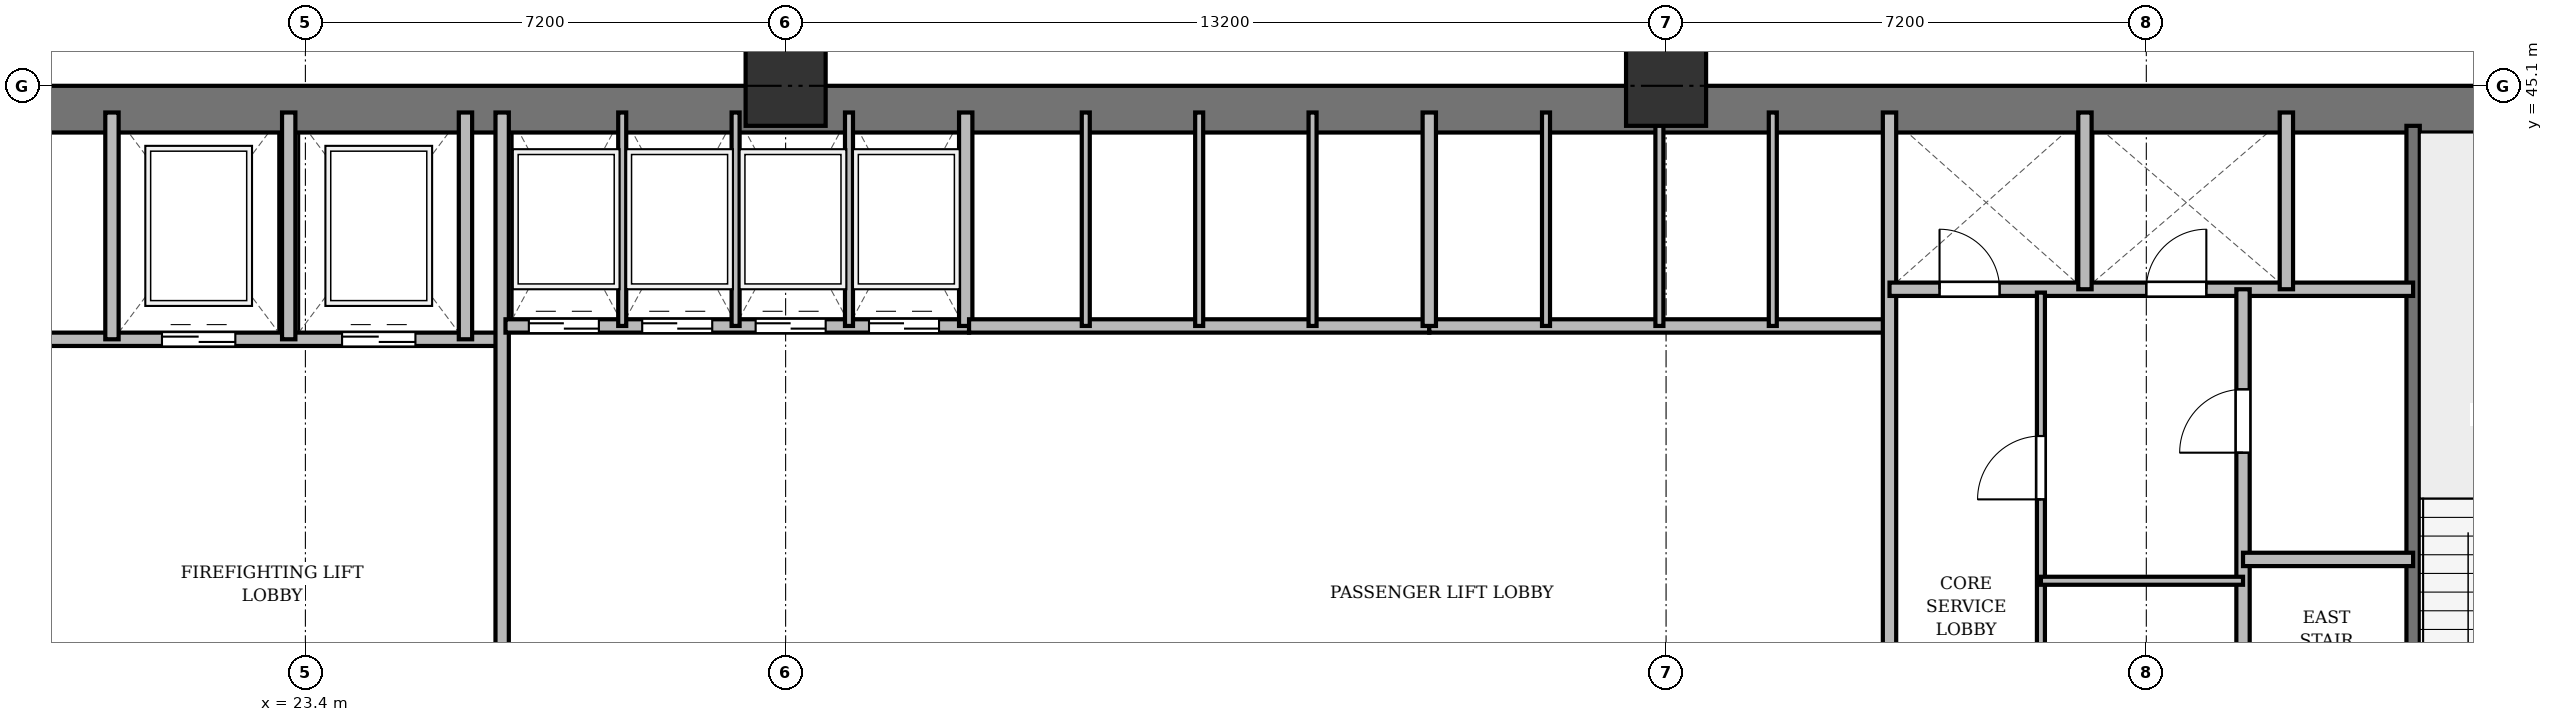
"""IFC4 building model, lengths in metres.
Left out: names, types, materials, properties, quantities, classifications, styles, units other than length and angle.
Written with IfcOpenShell. Run it as: python <this file> out.ifc"""

import sys

from ifc_helpers import new_model, si_unit, direction, frame, frame_2d, origin, origin_2d, place, context, subcontext, project, spatial, rectangle, extrude, source, transform, mapped, element, fill, save


model = new_model("IFC4")
c1 = context("Model", 3, precision=1e-05, world=origin(), true_north=direction((0.0, 1.0)))
c2 = subcontext(c1, "Body", "Model", "MODEL_VIEW")
j1 = project(units=[si_unit("LENGTHUNIT", "METRE"), si_unit("PLANEANGLEUNIT", "RADIAN")], contexts=[c1])
p1 = place(None, origin())
s1 = spatial("IfcSite", under=j1, at=p1, CompositionType="ELEMENT")
p2 = place(p1, origin())
s2 = spatial("IfcBuilding", under=s1, at=p2, CompositionType="ELEMENT")
p3 = place(p2, frame((0.0, 0.0, 5.2)))
s3 = spatial("IfcBuildingStorey", under=s2, at=p3, CompositionType="ELEMENT", Elevation=5.2)
m1 = source(origin(), c2, "Body", "SweptSolid", [
    extrude(rectangle(XDim=1.2, YDim=1.2, at=origin_2d()), origin(), (0.0, 0.0, 1.0), 4.5),
])
for number, where, z_axis, x_axis in (
    (1, (30.6, 45.1, 0.0), (0.0, 0.0, 1.0), (1.0, 0.0, 0.0)),
    (2, (43.8, 45.1, 0.0), (0.0, 0.0, 1.0), (1.0, 0.0, 0.0)),
):
    element("IfcColumn", number, at=place(p3, frame(where, z_axis=z_axis, x_axis=x_axis)), inside=s3, PredefinedType="COLUMN", context=c2, shape_type="MappedRepresentation", body=[
        mapped(m1, transform((0.0, 0.0, 0.0), x_axis=(1.0, 0.0, 0.0), y_axis=(0.0, 1.0, 0.0), z_axis=(0.0, 0.0, 1.0), scale=1.0)),
    ])
p4 = place(p3, frame((15.5, 44.75, 0.0), z_axis=(0.0, 0.0, 1.0), x_axis=(1.0, 0.0, 0.0)))
e3 = element("IfcWall", 3, at=p4, inside=s3, PredefinedType="SHEAR", context=c2, shape_type="SweptSolid", body=[
    extrude(rectangle(XDim=43.4, YDim=0.7, at=frame_2d((21.7, 0.0))), origin(), (0.0, 0.0, 1.0), 4.2),
])
p5 = place(p3, frame((55.0, 33.4, 0.0), z_axis=(0.0, 0.0, 1.0), x_axis=(0.0, 1.0, 0.0)))
e4 = element("IfcWall", 4, at=p5, inside=s3, PredefinedType="SHEAR", context=c2, shape_type="SweptSolid", body=[
    extrude(rectangle(XDim=11.1, YDim=0.2, at=frame_2d((5.55, 0.0))), origin(), (0.0, 0.0, 1.0), 4.2),
])
p6 = place(p5, frame((0.85, 0.0, 0.0)))
e5 = element("IfcOpeningElement", 5, at=p6, cuts=e4, PredefinedType="OPENING", context=c2, shape_type="SweptSolid", body=[
    extrude(rectangle(XDim=1.1, YDim=2.15, at=frame_2d((0.55, 1.075))), frame((0.0, 0.11, 0.0), z_axis=(0.0, -1.0, 0.0), x_axis=(1.0, 0.0, 0.0)), (0.0, 0.0, 1.0), 0.22),
])
p7 = place(p3, frame((19.55, 41.3, 0.0), z_axis=(0.0, 0.0, 1.0), x_axis=(1.0, 0.0, 0.0)))
e6 = element("IfcWall", 6, at=p7, inside=s3, PredefinedType="SOLIDWALL", context=c2, shape_type="SweptSolid", body=[
    extrude(rectangle(XDim=6.75, YDim=0.2, at=frame_2d((3.375, 0.0))), origin(), (0.0, 0.0, 1.0), 4.2),
])
p8 = place(p7, frame((1.7, 0.0, 0.0)))
e7 = element("IfcOpeningElement", 7, at=p8, cuts=e6, PredefinedType="OPENING", context=c2, shape_type="SweptSolid", body=[
    extrude(rectangle(XDim=1.1, YDim=2.15, at=frame_2d((0.55, 1.075))), frame((0.0, 0.11, 0.0), z_axis=(0.0, -1.0, 0.0), x_axis=(1.0, 0.0, 0.0)), (0.0, 0.0, 1.0), 0.22),
])
p9 = place(p7, frame((4.4, 0.0, 0.0)))
e8 = element("IfcOpeningElement", 8, at=p9, cuts=e6, PredefinedType="OPENING", context=c2, shape_type="SweptSolid", body=[
    extrude(rectangle(XDim=1.1, YDim=2.15, at=frame_2d((0.55, 1.075))), frame((0.0, 0.11, 0.0), z_axis=(0.0, -1.0, 0.0), x_axis=(1.0, 0.0, 0.0)), (0.0, 0.0, 1.0), 0.22),
])
for number, where, z_axis, x_axis in (
    (9, (20.5, 41.3, 0.0), (0.0, 0.0, 1.0), (0.0, 1.0, 0.0)),
    (10, (23.15, 41.3, 0.0), (0.0, 0.0, 1.0), (0.0, 1.0, 0.0)),
    (11, (25.8, 41.3, 0.0), (0.0, 0.0, 1.0), (0.0, 1.0, 0.0)),
):
    element("IfcWall", number, at=place(p3, frame(where, z_axis=z_axis, x_axis=x_axis)), inside=s3, PredefinedType="SOLIDWALL", context=c2, shape_type="SweptSolid", body=[
        extrude(rectangle(XDim=3.4, YDim=0.2, at=frame_2d((1.7, 0.0))), origin(), (0.0, 0.0, 1.0), 4.2),
    ])
p10 = place(p3, frame((26.35, 33.4, 0.0), z_axis=(0.0, 0.0, 1.0), x_axis=(0.0, 1.0, 0.0)))
e12 = element("IfcWall", 12, at=p10, inside=s3, PredefinedType="SOLIDWALL", context=c2, shape_type="SweptSolid", body=[
    extrude(rectangle(XDim=11.3, YDim=0.2, at=frame_2d((5.65, 0.0))), origin(), (0.0, 0.0, 1.0), 3.1),
])
p11 = place(p3, frame((26.4, 41.5, 0.0), z_axis=(0.0, 0.0, 1.0), x_axis=(1.0, 0.0, 0.0)))
e13 = element("IfcWall", 13, at=p11, inside=s3, PredefinedType="SOLIDWALL", context=c2, shape_type="SweptSolid", body=[
    extrude(rectangle(XDim=6.95, YDim=0.2, at=frame_2d((3.475, 0.0))), origin(), (0.0, 0.0, 1.0), 4.2),
])
p12 = place(p11, frame((0.35, 0.0, 0.0)))
e14 = element("IfcOpeningElement", 14, at=p12, cuts=e13, PredefinedType="OPENING", context=c2, shape_type="SweptSolid", body=[
    extrude(rectangle(XDim=1.05, YDim=2.15, at=frame_2d((0.525, 1.075))), frame((0.0, 0.11, 0.0), z_axis=(0.0, -1.0, 0.0), x_axis=(1.0, 0.0, 0.0)), (0.0, 0.0, 1.0), 0.22),
])
p13 = place(p11, frame((2.05, 0.0, 0.0)))
e15 = element("IfcOpeningElement", 15, at=p13, cuts=e13, PredefinedType="OPENING", context=c2, shape_type="SweptSolid", body=[
    extrude(rectangle(XDim=1.05, YDim=2.15, at=frame_2d((0.525, 1.075))), frame((0.0, 0.11, 0.0), z_axis=(0.0, -1.0, 0.0), x_axis=(1.0, 0.0, 0.0)), (0.0, 0.0, 1.0), 0.22),
])
p14 = place(p11, frame((3.75, 0.0, 0.0)))
e16 = element("IfcOpeningElement", 16, at=p14, cuts=e13, PredefinedType="OPENING", context=c2, shape_type="SweptSolid", body=[
    extrude(rectangle(XDim=1.05, YDim=2.15, at=frame_2d((0.525, 1.075))), frame((0.0, 0.11, 0.0), z_axis=(0.0, -1.0, 0.0), x_axis=(1.0, 0.0, 0.0)), (0.0, 0.0, 1.0), 0.22),
])
p15 = place(p11, frame((5.45, 0.0, 0.0)))
e17 = element("IfcOpeningElement", 17, at=p15, cuts=e13, PredefinedType="OPENING", context=c2, shape_type="SweptSolid", body=[
    extrude(rectangle(XDim=1.05, YDim=2.15, at=frame_2d((0.525, 1.075))), frame((0.0, 0.11, 0.0), z_axis=(0.0, -1.0, 0.0), x_axis=(1.0, 0.0, 0.0)), (0.0, 0.0, 1.0), 0.22),
])
p16 = place(p3, frame((33.3, 41.5, 0.0), z_axis=(0.0, 0.0, 1.0), x_axis=(0.0, 1.0, 0.0)))
e18 = element("IfcWall", 18, at=p16, inside=s3, PredefinedType="SOLIDWALL", context=c2, shape_type="SweptSolid", body=[
    extrude(rectangle(XDim=3.2, YDim=0.2, at=frame_2d((1.6, 0.0))), origin(), (0.0, 0.0, 1.0), 4.2),
])
for number, where, z_axis, x_axis in (
    (19, (28.15, 41.5, 0.0), (0.0, 0.0, 1.0), (0.0, 1.0, 0.0)),
    (20, (29.85, 41.5, 0.0), (0.0, 0.0, 1.0), (0.0, 1.0, 0.0)),
    (21, (31.55, 41.5, 0.0), (0.0, 0.0, 1.0), (0.0, 1.0, 0.0)),
):
    element("IfcWall", number, at=place(p3, frame(where, z_axis=z_axis, x_axis=x_axis)), inside=s3, PredefinedType="PARTITIONING", context=c2, shape_type="SweptSolid", body=[
        extrude(rectangle(XDim=3.2, YDim=0.12, at=frame_2d((1.6, 0.0))), origin(), (0.0, 0.0, 1.0), 4.2),
    ])
p17 = place(p3, frame((33.35, 41.5, 0.0), z_axis=(0.0, 0.0, 1.0), x_axis=(1.0, 0.0, 0.0)))
e22 = element("IfcWall", 22, at=p17, inside=s3, PredefinedType="SOLIDWALL", context=c2, shape_type="SweptSolid", body=[
    extrude(rectangle(XDim=6.9, YDim=0.2, at=frame_2d((3.45, 0.0))), origin(), (0.0, 0.0, 1.0), 4.2),
])
for number, where, z_axis, x_axis in (
    (23, (35.1, 41.5, 0.0), (0.0, 0.0, 1.0), (0.0, 1.0, 0.0)),
    (24, (36.8, 41.5, 0.0), (0.0, 0.0, 1.0), (0.0, 1.0, 0.0)),
    (25, (38.5, 41.5, 0.0), (0.0, 0.0, 1.0), (0.0, 1.0, 0.0)),
):
    element("IfcWall", number, at=place(p3, frame(where, z_axis=z_axis, x_axis=x_axis)), inside=s3, PredefinedType="PARTITIONING", context=c2, shape_type="SweptSolid", body=[
        extrude(rectangle(XDim=3.2, YDim=0.12, at=frame_2d((1.6, 0.0))), origin(), (0.0, 0.0, 1.0), 4.2),
    ])
p18 = place(p3, frame((40.25, 41.5, 0.0), z_axis=(0.0, 0.0, 1.0), x_axis=(1.0, 0.0, 0.0)))
e26 = element("IfcWall", 26, at=p18, inside=s3, PredefinedType="SOLIDWALL", context=c2, shape_type="SweptSolid", body=[
    extrude(rectangle(XDim=6.9, YDim=0.2, at=frame_2d((3.45, 0.0))), origin(), (0.0, 0.0, 1.0), 3.4),
])
p19 = place(p3, frame((40.25, 41.5, 0.0), z_axis=(0.0, 0.0, 1.0), x_axis=(0.0, 1.0, 0.0)))
e27 = element("IfcWall", 27, at=p19, inside=s3, PredefinedType="SOLIDWALL", context=c2, shape_type="SweptSolid", body=[
    extrude(rectangle(XDim=3.2, YDim=0.2, at=frame_2d((1.6, 0.0))), origin(), (0.0, 0.0, 1.0), 4.2),
])
p20 = place(p3, frame((42.0, 41.5, 0.0), z_axis=(0.0, 0.0, 1.0), x_axis=(0.0, 1.0, 0.0)))
e28 = element("IfcWall", 28, at=p20, inside=s3, PredefinedType="PARTITIONING", context=c2, shape_type="SweptSolid", body=[
    extrude(rectangle(XDim=3.2, YDim=0.12, at=frame_2d((1.6, 0.0))), origin(), (0.0, 0.0, 1.0), 4.2),
])
p21 = place(p3, frame((43.7, 41.5, 0.0), z_axis=(0.0, 0.0, 1.0), x_axis=(0.0, 1.0, 0.0)))
e29 = element("IfcWall", 29, at=p21, inside=s3, PredefinedType="PARTITIONING", context=c2, shape_type="SweptSolid", body=[
    extrude(rectangle(XDim=3.2, YDim=0.12, at=frame_2d((1.6, 0.0))), origin(), (0.0, 0.0, 1.0), 3.4),
])
p22 = place(p3, frame((45.4, 41.5, 0.0), z_axis=(0.0, 0.0, 1.0), x_axis=(0.0, 1.0, 0.0)))
e30 = element("IfcWall", 30, at=p22, inside=s3, PredefinedType="PARTITIONING", context=c2, shape_type="SweptSolid", body=[
    extrude(rectangle(XDim=3.2, YDim=0.12, at=frame_2d((1.6, 0.0))), origin(), (0.0, 0.0, 1.0), 4.2),
])
p23 = place(p3, frame((47.15, 33.4, 0.0), z_axis=(0.0, 0.0, 1.0), x_axis=(0.0, 1.0, 0.0)))
e31 = element("IfcWall", 31, at=p23, inside=s3, PredefinedType="SOLIDWALL", context=c2, shape_type="SweptSolid", body=[
    extrude(rectangle(XDim=11.3, YDim=0.2, at=frame_2d((5.65, 0.0))), origin(), (0.0, 0.0, 1.0), 3.1),
])
p24 = place(p3, frame((47.15, 42.05, 0.0), z_axis=(0.0, 0.0, 1.0), x_axis=(1.0, 0.0, 0.0)))
e32 = element("IfcWall", 32, at=p24, inside=s3, PredefinedType="SOLIDWALL", context=c2, shape_type="SweptSolid", body=[
    extrude(rectangle(XDim=7.85, YDim=0.2, at=frame_2d((3.925, 0.0))), origin(), (0.0, 0.0, 1.0), 4.2),
])
p25 = place(p24, frame((0.75, 0.0, 0.0)))
e33 = element("IfcOpeningElement", 33, at=p25, cuts=e32, PredefinedType="OPENING", context=c2, shape_type="SweptSolid", body=[
    extrude(rectangle(XDim=0.9, YDim=2.1, at=frame_2d((0.45, 1.05))), frame((0.0, 0.11, 0.0), z_axis=(0.0, -1.0, 0.0), x_axis=(1.0, 0.0, 0.0)), (0.0, 0.0, 1.0), 0.22),
])
p26 = place(p24, frame((3.85, 0.0, 0.0)))
e34 = element("IfcOpeningElement", 34, at=p26, cuts=e32, PredefinedType="OPENING", context=c2, shape_type="SweptSolid", body=[
    extrude(rectangle(XDim=0.9, YDim=2.1, at=frame_2d((0.45, 1.05))), frame((0.0, 0.11, 0.0), z_axis=(0.0, -1.0, 0.0), x_axis=(1.0, 0.0, 0.0)), (0.0, 0.0, 1.0), 0.22),
])
for number, where, z_axis, x_axis in (
    (35, (50.08, 42.05, 0.0), (0.0, 0.0, 1.0), (0.0, 1.0, 0.0)),
    (36, (53.1, 42.05, 0.0), (0.0, 0.0, 1.0), (0.0, 1.0, 0.0)),
):
    element("IfcWall", number, at=place(p3, frame(where, z_axis=z_axis, x_axis=x_axis)), inside=s3, PredefinedType="SOLIDWALL", context=c2, shape_type="SweptSolid", body=[
        extrude(rectangle(XDim=2.65, YDim=0.2, at=frame_2d((1.325, 0.0))), origin(), (0.0, 0.0, 1.0), 4.2),
    ])
p27 = place(p3, frame((52.45, 33.4, 0.0), z_axis=(0.0, 0.0, 1.0), x_axis=(0.0, 1.0, 0.0)))
e37 = element("IfcWall", 37, at=p27, inside=s3, PredefinedType="PARTITIONING", context=c2, shape_type="SweptSolid", body=[
    extrude(rectangle(XDim=8.65, YDim=0.2, at=frame_2d((4.325, 0.0))), origin(), (0.0, 0.0, 1.0), 3.1),
])
p28 = place(p27, frame((6.2, 0.0, 0.0)))
e38 = element("IfcOpeningElement", 38, at=p28, cuts=e37, PredefinedType="OPENING", context=c2, shape_type="SweptSolid", body=[
    extrude(rectangle(XDim=0.95, YDim=2.15, at=frame_2d((0.475, 1.075))), frame((0.0, 0.11, 0.0), z_axis=(0.0, -1.0, 0.0), x_axis=(1.0, 0.0, 0.0)), (0.0, 0.0, 1.0), 0.22),
])
p29 = place(p3, frame((52.45, 38.0, 0.0), z_axis=(0.0, 0.0, 1.0), x_axis=(1.0, 0.0, 0.0)))
e39 = element("IfcWall", 39, at=p29, inside=s3, PredefinedType="PARTITIONING", context=c2, shape_type="SweptSolid", body=[
    extrude(rectangle(XDim=2.55, YDim=0.2, at=frame_2d((1.275, 0.0))), origin(), (0.0, 0.0, 1.0), 4.2),
])
p30 = place(p3, frame((49.42, 33.4, 0.0), z_axis=(0.0, 0.0, 1.0), x_axis=(0.0, 1.0, 0.0)))
e40 = element("IfcWall", 40, at=p30, inside=s3, PredefinedType="PARTITIONING", context=c2, shape_type="SweptSolid", body=[
    extrude(rectangle(XDim=8.6, YDim=0.12, at=frame_2d((4.3, 0.0))), origin(), (0.0, 0.0, 1.0), 3.1),
])
p31 = place(p30, frame((1.3, 0.0, 0.0)))
e41 = element("IfcOpeningElement", 41, at=p31, cuts=e40, PredefinedType="OPENING", context=c2, shape_type="SweptSolid", body=[
    extrude(rectangle(XDim=0.95, YDim=2.15, at=frame_2d((0.475, 1.075))), frame((0.0, 0.07, 0.0), z_axis=(0.0, -1.0, 0.0), x_axis=(1.0, 0.0, 0.0)), (0.0, 0.0, 1.0), 0.14),
])
p32 = place(p30, frame((5.5, 0.0, 0.0)))
e42 = element("IfcOpeningElement", 42, at=p32, cuts=e40, PredefinedType="OPENING", context=c2, shape_type="SweptSolid", body=[
    extrude(rectangle(XDim=0.95, YDim=2.15, at=frame_2d((0.475, 1.075))), frame((0.0, 0.07, 0.0), z_axis=(0.0, -1.0, 0.0), x_axis=(1.0, 0.0, 0.0)), (0.0, 0.0, 1.0), 0.14),
])
p33 = place(p3, frame((49.42, 37.68, 0.0), z_axis=(0.0, 0.0, 1.0), x_axis=(1.0, 0.0, 0.0)))
e43 = element("IfcWall", 43, at=p33, inside=s3, PredefinedType="PARTITIONING", context=c2, shape_type="SweptSolid", body=[
    extrude(rectangle(XDim=3.03, YDim=0.12, at=frame_2d((1.515, 0.0))), origin(), (0.0, 0.0, 1.0), 4.2),
])
m2 = source(origin(), c2, "Body", "SweptSolid", [
    extrude(rectangle(XDim=1.1, YDim=2.15, at=frame_2d((0.55, 1.075))), frame((0.0, 0.025, 0.0), z_axis=(0.0, -1.0, 0.0), x_axis=(1.0, 0.0, 0.0)), (0.0, 0.0, 1.0), 0.05),
])
p34 = place(p8, origin())
e44 = element("IfcDoor", 44, at=p34, inside=s3, OperationType="DOUBLE_DOOR_SLIDING", PredefinedType="DOOR", context=c2, shape_type="MappedRepresentation", body=[
    mapped(m2, transform((0.0, 0.0, 0.0), x_axis=(1.0, 0.0, 0.0), y_axis=(0.0, 1.0, 0.0), z_axis=(0.0, 0.0, 1.0), scale=1.0)),
])
fill(e7, e44)
p35 = place(p9, origin())
e45 = element("IfcDoor", 45, at=p35, inside=s3, OperationType="DOUBLE_DOOR_SLIDING", PredefinedType="DOOR", context=c2, shape_type="MappedRepresentation", body=[
    mapped(m2, transform((0.0, 0.0, 0.0), x_axis=(1.0, 0.0, 0.0), y_axis=(0.0, 1.0, 0.0), z_axis=(0.0, 0.0, 1.0), scale=1.0)),
])
fill(e8, e45)
m3 = source(origin(), c2, "Body", "SweptSolid", [
    extrude(rectangle(XDim=1.05, YDim=2.15, at=frame_2d((0.525, 1.075))), frame((0.0, 0.025, 0.0), z_axis=(0.0, -1.0, 0.0), x_axis=(1.0, 0.0, 0.0)), (0.0, 0.0, 1.0), 0.05),
])
p36 = place(p12, origin())
e46 = element("IfcDoor", 46, at=p36, inside=s3, OperationType="DOUBLE_DOOR_SLIDING", PredefinedType="DOOR", context=c2, shape_type="MappedRepresentation", body=[
    mapped(m3, transform((0.0, 0.0, 0.0), x_axis=(1.0, 0.0, 0.0), y_axis=(0.0, 1.0, 0.0), z_axis=(0.0, 0.0, 1.0), scale=1.0)),
])
fill(e14, e46)
p37 = place(p13, origin())
e47 = element("IfcDoor", 47, at=p37, inside=s3, OperationType="DOUBLE_DOOR_SLIDING", PredefinedType="DOOR", context=c2, shape_type="MappedRepresentation", body=[
    mapped(m3, transform((0.0, 0.0, 0.0), x_axis=(1.0, 0.0, 0.0), y_axis=(0.0, 1.0, 0.0), z_axis=(0.0, 0.0, 1.0), scale=1.0)),
])
fill(e15, e47)
p38 = place(p14, origin())
e48 = element("IfcDoor", 48, at=p38, inside=s3, OperationType="DOUBLE_DOOR_SLIDING", PredefinedType="DOOR", context=c2, shape_type="MappedRepresentation", body=[
    mapped(m3, transform((0.0, 0.0, 0.0), x_axis=(1.0, 0.0, 0.0), y_axis=(0.0, 1.0, 0.0), z_axis=(0.0, 0.0, 1.0), scale=1.0)),
])
fill(e16, e48)
p39 = place(p15, origin())
e49 = element("IfcDoor", 49, at=p39, inside=s3, OperationType="DOUBLE_DOOR_SLIDING", PredefinedType="DOOR", context=c2, shape_type="MappedRepresentation", body=[
    mapped(m3, transform((0.0, 0.0, 0.0), x_axis=(1.0, 0.0, 0.0), y_axis=(0.0, 1.0, 0.0), z_axis=(0.0, 0.0, 1.0), scale=1.0)),
])
fill(e17, e49)
m4 = source(origin(), c2, "Body", "SweptSolid", [
    extrude(rectangle(XDim=0.9, YDim=2.1, at=frame_2d((0.45, 1.05))), frame((0.0, 0.025, 0.0), z_axis=(0.0, -1.0, 0.0), x_axis=(1.0, 0.0, 0.0)), (0.0, 0.0, 1.0), 0.05),
])
p40 = place(p25, origin())
e50 = element("IfcDoor", 50, at=p40, inside=s3, OperationType="SINGLE_SWING_LEFT", PredefinedType="DOOR", context=c2, shape_type="MappedRepresentation", body=[
    mapped(m4, transform((0.0, 0.0, 0.0), x_axis=(1.0, 0.0, 0.0), y_axis=(0.0, 1.0, 0.0), z_axis=(0.0, 0.0, 1.0), scale=1.0)),
])
fill(e33, e50)
p41 = place(p26, origin())
e51 = element("IfcDoor", 51, at=p41, inside=s3, OperationType="SINGLE_SWING_RIGHT", PredefinedType="DOOR", context=c2, shape_type="MappedRepresentation", body=[
    mapped(m4, transform((0.0, 0.0, 0.0), x_axis=(1.0, 0.0, 0.0), y_axis=(0.0, 1.0, 0.0), z_axis=(0.0, 0.0, 1.0), scale=1.0)),
])
fill(e34, e51)
m5 = source(origin(), c2, "Body", "SweptSolid", [
    extrude(rectangle(XDim=0.95, YDim=2.15, at=frame_2d((0.475, 1.075))), frame((0.0, 0.025, 0.0), z_axis=(0.0, -1.0, 0.0), x_axis=(1.0, 0.0, 0.0)), (0.0, 0.0, 1.0), 0.05),
])
p42 = place(p28, origin())
e52 = element("IfcDoor", 52, at=p42, inside=s3, OperationType="SINGLE_SWING_LEFT", PredefinedType="DOOR", context=c2, shape_type="MappedRepresentation", body=[
    mapped(m5, transform((0.0, 0.0, 0.0), x_axis=(1.0, 0.0, 0.0), y_axis=(0.0, 1.0, 0.0), z_axis=(0.0, 0.0, 1.0), scale=1.0)),
])
fill(e38, e52)
p43 = place(p32, origin())
e53 = element("IfcDoor", 53, at=p43, inside=s3, OperationType="SINGLE_SWING_LEFT", PredefinedType="DOOR", context=c2, shape_type="MappedRepresentation", body=[
    mapped(m5, transform((0.0, 0.0, 0.0), x_axis=(1.0, 0.0, 0.0), y_axis=(0.0, 1.0, 0.0), z_axis=(0.0, 0.0, 1.0), scale=1.0)),
])
fill(e42, e53)
save(model, sys.argv[1])
